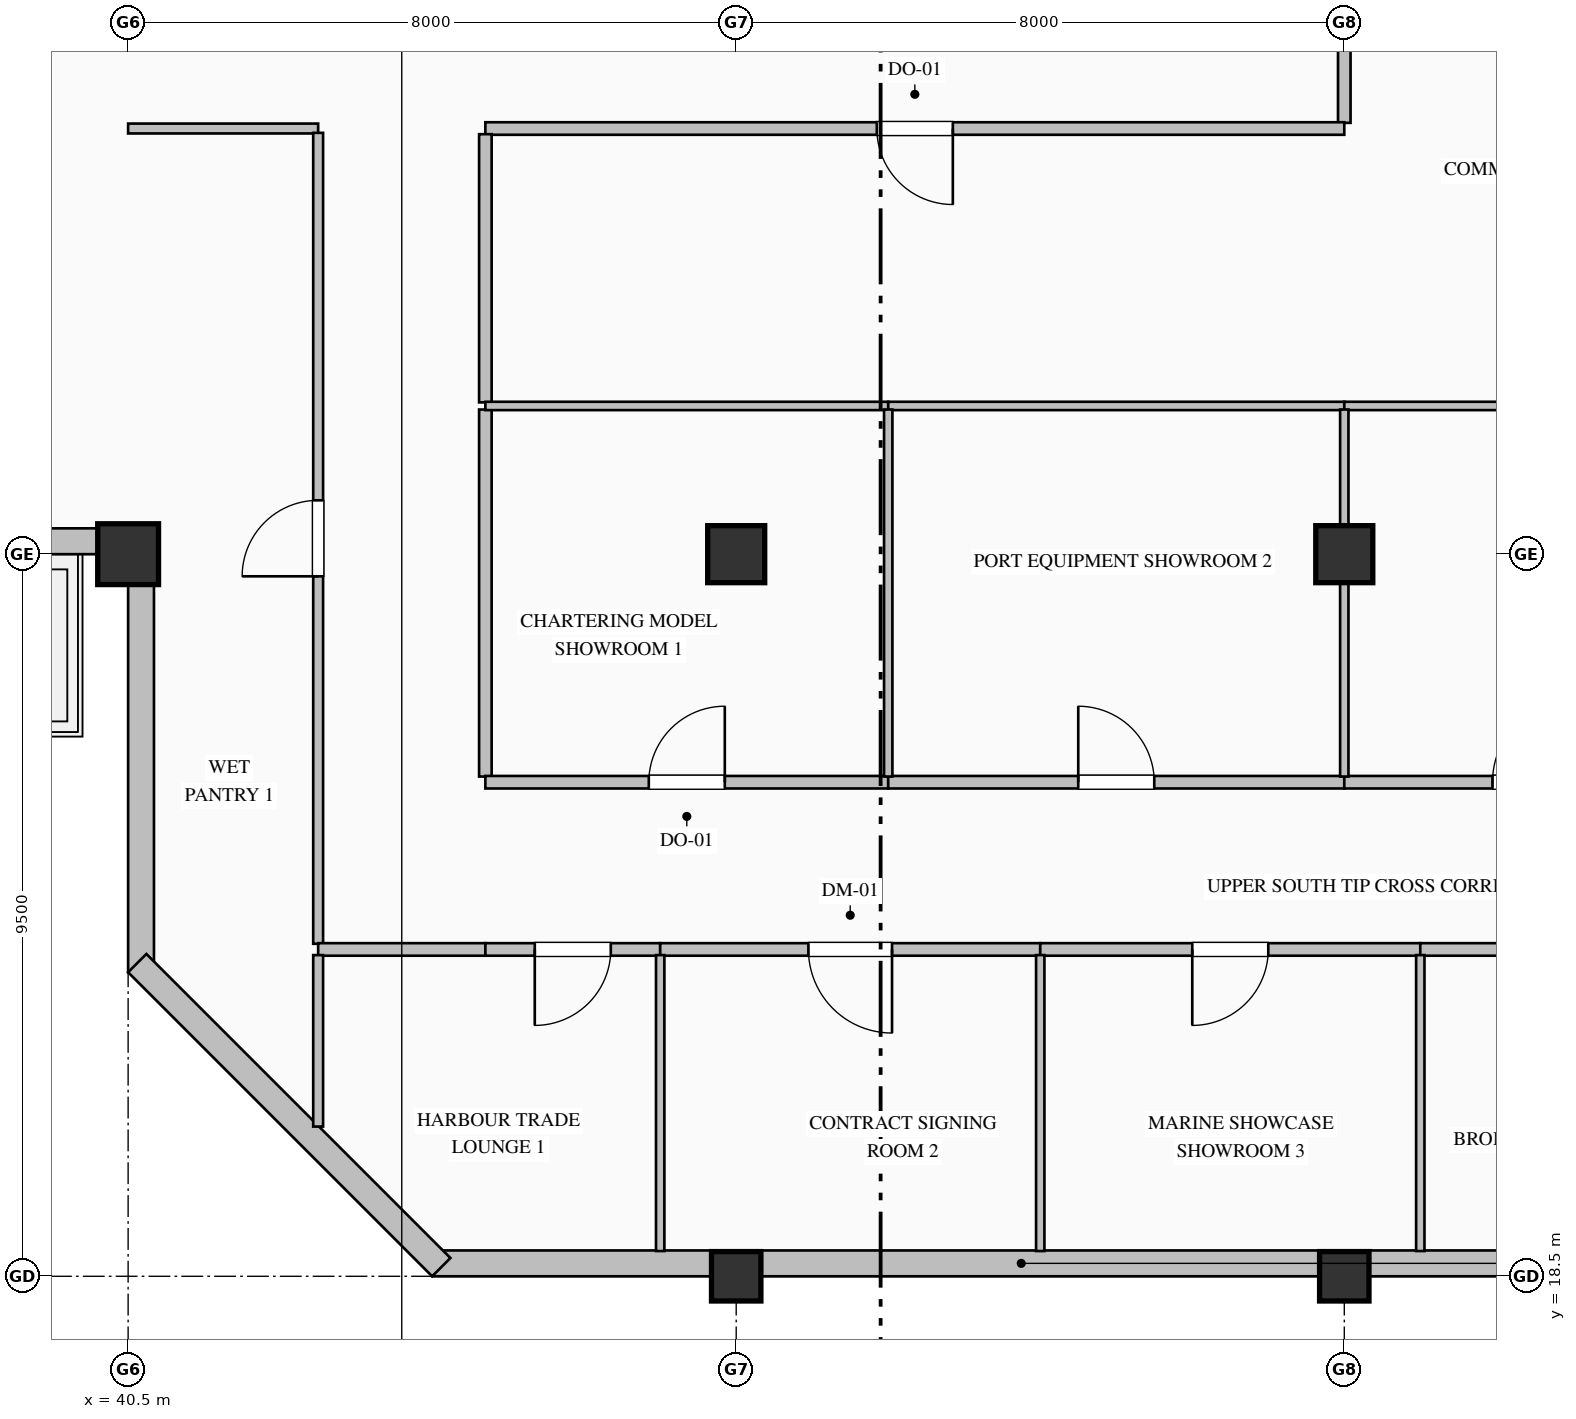
"""IFC4 building model, lengths in metres.
Left out: names, types, materials, properties, quantities, classifications, styles, units other than length and angle.
Written with IfcOpenShell. Run it as: python <this file> out.ifc"""

import sys

from ifc_helpers import new_model, si_unit, direction, frame, frame_2d, origin, origin_2d, place, context, subcontext, project, spatial, rectangle, hollow_rectangle, extrude, element, fill, save


model = new_model("IFC4")
c1 = context("Model", 3, precision=1e-05, world=origin(), true_north=direction((0.0, 1.0)))
c2 = subcontext(c1, "Body", "Model", "MODEL_VIEW")
j1 = project(units=[si_unit("LENGTHUNIT", "METRE"), si_unit("PLANEANGLEUNIT", "RADIAN")], contexts=[c1])
p1 = place(None, origin())
s1 = spatial("IfcSite", under=j1, at=p1, CompositionType="ELEMENT")
p2 = place(p1, origin())
s2 = spatial("IfcBuilding", under=s1, at=p2, CompositionType="ELEMENT")
p3 = place(p2, frame((0.0, 0.0, 359.2)))
s3 = spatial("IfcBuildingStorey", under=s2, at=p3, CompositionType="ELEMENT", Elevation=359.2)
p4 = place(p3, frame((40.5, 28.0, 0.0), z_axis=(0.0, 0.0, 1.0), x_axis=(1.0, 0.0, 0.0)))
e1 = element("IfcColumn", 1, at=p4, inside=s3, PredefinedType="COLUMN", context=c2, shape_type="SweptSolid", body=[
    extrude(hollow_rectangle(XDim=0.8, YDim=0.8, WallThickness=0.032, at=origin_2d()), origin(), (0.0, 0.0, 1.0), 4.0),
])
p5 = place(p3, frame((48.5, 18.5, 0.0), z_axis=(0.0, 0.0, 1.0), x_axis=(1.0, 0.0, 0.0)))
e2 = element("IfcColumn", 2, at=p5, inside=s3, PredefinedType="COLUMN", context=c2, shape_type="SweptSolid", body=[
    extrude(hollow_rectangle(XDim=0.65, YDim=0.65, WallThickness=0.028, at=origin_2d()), origin(), (0.0, 0.0, 1.0), 4.0),
])
p6 = place(p3, frame((48.5, 28.0, 0.0), z_axis=(0.0, 0.0, 1.0), x_axis=(1.0, 0.0, 0.0)))
e3 = element("IfcColumn", 3, at=p6, inside=s3, PredefinedType="COLUMN", context=c2, shape_type="SweptSolid", body=[
    extrude(rectangle(XDim=0.75, YDim=0.75, at=origin_2d()), origin(), (0.0, 0.0, 1.0), 4.0),
])
p7 = place(p3, frame((56.5, 18.5, 0.0), z_axis=(0.0, 0.0, 1.0), x_axis=(1.0, 0.0, 0.0)))
e4 = element("IfcColumn", 4, at=p7, inside=s3, PredefinedType="COLUMN", context=c2, shape_type="SweptSolid", body=[
    extrude(hollow_rectangle(XDim=0.65, YDim=0.65, WallThickness=0.028, at=origin_2d()), origin(), (0.0, 0.0, 1.0), 4.0),
])
p8 = place(p3, frame((56.5, 28.0, 0.0), z_axis=(0.0, 0.0, 1.0), x_axis=(1.0, 0.0, 0.0)))
e5 = element("IfcColumn", 5, at=p8, inside=s3, PredefinedType="COLUMN", context=c2, shape_type="SweptSolid", body=[
    extrude(rectangle(XDim=0.75, YDim=0.75, at=origin_2d()), origin(), (0.0, 0.0, 1.0), 4.0),
])
p9 = place(p3, frame((40.67, 22.5, 0.0), z_axis=(0.0, 0.0, 1.0), x_axis=(0.0, 1.0, 0.0)))
e6 = element("IfcWall", 6, at=p9, inside=s3, PredefinedType="SOLIDWALL", context=c2, shape_type="SweptSolid", body=[
    extrude(rectangle(XDim=5.84, YDim=0.34, at=frame_2d((2.92, 0.0))), origin(), (0.0, 0.0, 1.0), 3.185),
])
p10 = place(p3, frame((40.52, 28.17, 0.0), z_axis=(0.0, 0.0, 1.0), x_axis=(-1.0, 0.0, 0.0)))
e7 = element("IfcWall", 7, at=p10, inside=s3, PredefinedType="SOLIDWALL", context=c2, shape_type="SweptSolid", body=[
    extrude(rectangle(XDim=20.02, YDim=0.34, at=frame_2d((10.01, 0.0))), origin(), (0.0, 0.0, 1.0), 3.185),
])
p11 = place(p10, frame((3.075, 0.0, 0.8)))
e8 = element("IfcOpeningElement", 8, at=p11, cuts=e7, PredefinedType="OPENING", context=c2, shape_type="SweptSolid", body=[
    extrude(rectangle(XDim=1.05, YDim=2.15, at=frame_2d((0.525, 1.075))), frame((0.0, 0.18, 0.0), z_axis=(0.0, -1.0, 0.0), x_axis=(1.0, 0.0, 0.0)), (0.0, 0.0, 1.0), 0.36),
])
p12 = place(p10, frame((13.875, 0.0, 0.8)))
e9 = element("IfcOpeningElement", 9, at=p12, cuts=e7, PredefinedType="OPENING", context=c2, shape_type="SweptSolid", body=[
    extrude(rectangle(XDim=1.05, YDim=2.15, at=frame_2d((0.525, 1.075))), frame((0.0, 0.18, 0.0), z_axis=(0.0, -1.0, 0.0), x_axis=(1.0, 0.0, 0.0)), (0.0, 0.0, 1.0), 0.36),
])
p13 = place(p10, frame((11.395, 0.0, 0.0)))
e10 = element("IfcOpeningElement", 10, at=p13, cuts=e7, PredefinedType="OPENING", context=c2, shape_type="SweptSolid", body=[
    extrude(rectangle(XDim=1.25, YDim=2.25, at=frame_2d((0.625, 1.125))), frame((0.0, 0.18, 0.0), z_axis=(0.0, -1.0, 0.0), x_axis=(1.0, 0.0, 0.0)), (0.0, 0.0, 1.0), 0.36),
])
p14 = place(p3, frame((60.0, 18.67, 0.0), z_axis=(0.0, 0.0, 1.0), x_axis=(-1.0, 0.0, 0.0)))
e11 = element("IfcWall", 11, at=p14, inside=s3, PredefinedType="SOLIDWALL", context=c2, shape_type="SweptSolid", body=[
    extrude(rectangle(XDim=15.5, YDim=0.34, at=frame_2d((7.75, 0.0))), origin(), (0.0, 0.0, 1.0), 3.335),
])
p15 = place(p3, frame((44.62, 18.62, 0.0), z_axis=(0.0, 0.0, 1.0), x_axis=(-0.707106781187, 0.707106781187, 0.0)))
e12 = element("IfcWall", 12, at=p15, inside=s3, PredefinedType="SOLIDWALL", context=c2, shape_type="SweptSolid", body=[
    extrude(rectangle(XDim=5.657, YDim=0.34, at=frame_2d((2.828, 0.0))), origin(), (0.0, 0.0, 1.0), 3.785),
])
p16 = place(p3, frame((56.5, 36.0, 0.0), z_axis=(0.0, 0.0, 1.0), x_axis=(0.0, -1.0, 0.0)))
e13 = element("IfcWall", 13, at=p16, inside=s3, PredefinedType="PARTITIONING", context=c2, shape_type="SweptSolid", body=[
    extrude(rectangle(XDim=2.325, YDim=0.165, at=frame_2d((1.163, 0.0))), origin(), (0.0, 0.0, 1.0), 3.177),
])
p17 = place(p3, frame((56.5, 33.6, 0.0), z_axis=(0.0, 0.0, 1.0), x_axis=(-1.0, 0.0, 0.0)))
e14 = element("IfcWall", 14, at=p17, inside=s3, PredefinedType="PARTITIONING", context=c2, shape_type="SweptSolid", body=[
    extrude(rectangle(XDim=11.3, YDim=0.165, at=frame_2d((5.65, 0.0))), origin(), (0.0, 0.0, 1.0), 3.785),
])
p18 = place(p17, frame((5.15, 0.0, 0.0)))
e15 = element("IfcOpeningElement", 15, at=p18, cuts=e14, PredefinedType="OPENING", context=c2, shape_type="SweptSolid", body=[
    extrude(rectangle(XDim=1.0, YDim=2.15, at=frame_2d((0.5, 1.075))), frame((0.0, 0.093, 0.0), z_axis=(0.0, -1.0, 0.0), x_axis=(1.0, 0.0, 0.0)), (0.0, 0.0, 1.0), 0.185),
])
p19 = place(p3, frame((43.0, 33.6, 0.0), z_axis=(0.0, 0.0, 1.0), x_axis=(-1.0, 0.0, 0.0)))
e16 = element("IfcWall", 16, at=p19, inside=s3, PredefinedType="PARTITIONING", context=c2, shape_type="SweptSolid", body=[
    extrude(rectangle(XDim=2.5, YDim=0.13, at=frame_2d((1.25, 0.0))), origin(), (0.0, 0.0, 1.0), 3.785),
])
p20 = place(p3, frame((45.2, 33.525, 0.0), z_axis=(0.0, 0.0, 1.0), x_axis=(0.0, -1.0, 0.0)))
e17 = element("IfcWall", 17, at=p20, inside=s3, PredefinedType="PARTITIONING", context=c2, shape_type="SweptSolid", body=[
    extrude(rectangle(XDim=3.528, YDim=0.165, at=frame_2d((1.764, 0.0))), origin(), (0.0, 0.0, 1.0), 3.785),
])
p21 = place(p3, frame((45.2, 29.903, 0.0), z_axis=(0.0, 0.0, 1.0), x_axis=(0.0, -1.0, 0.0)))
e18 = element("IfcWall", 18, at=p21, inside=s3, PredefinedType="PARTITIONING", context=c2, shape_type="SweptSolid", body=[
    extrude(rectangle(XDim=4.829, YDim=0.165, at=frame_2d((2.414, 0.0))), origin(), (0.0, 0.0, 1.0), 3.785),
])
p22 = place(p3, frame((43.0, 22.875, 0.0), z_axis=(0.0, 0.0, 1.0), x_axis=(0.0, 1.0, 0.0)))
e19 = element("IfcWall", 19, at=p22, inside=s3, PredefinedType="PARTITIONING", context=c2, shape_type="SweptSolid", body=[
    extrude(rectangle(XDim=10.668, YDim=0.13, at=frame_2d((5.334, 0.0))), origin(), (0.0, 0.0, 1.0), 3.785),
])
p23 = place(p22, frame((4.834, 0.0, 0.0)))
e20 = element("IfcOpeningElement", 20, at=p23, cuts=e19, PredefinedType="OPENING", context=c2, shape_type="SweptSolid", body=[
    extrude(rectangle(XDim=1.0, YDim=2.15, at=frame_2d((0.5, 1.075))), frame((0.0, 0.075, 0.0), z_axis=(0.0, -1.0, 0.0), x_axis=(1.0, 0.0, 0.0)), (0.0, 0.0, 1.0), 0.15),
])
p24 = place(p3, frame((45.2, 22.8, 0.0), z_axis=(0.0, 0.0, 1.0), x_axis=(-1.0, 0.0, 0.0)))
e21 = element("IfcWall", 21, at=p24, inside=s3, PredefinedType="PARTITIONING", context=c2, shape_type="SweptSolid", body=[
    extrude(rectangle(XDim=2.2, YDim=0.165, at=frame_2d((1.1, 0.0))), origin(), (0.0, 0.0, 1.0), 3.785),
])
p25 = place(p3, frame((45.2, 25.0, 0.0), z_axis=(0.0, 0.0, 1.0), x_axis=(1.0, 0.0, 0.0)))
e22 = element("IfcWall", 22, at=p25, inside=s3, PredefinedType="PARTITIONING", context=c2, shape_type="SweptSolid", body=[
    extrude(rectangle(XDim=5.3, YDim=0.165, at=frame_2d((2.65, 0.0))), origin(), (0.0, 0.0, 1.0), 3.785),
])
p26 = place(p25, frame((2.15, 0.0, 0.0)))
e23 = element("IfcOpeningElement", 23, at=p26, cuts=e22, PredefinedType="OPENING", context=c2, shape_type="SweptSolid", body=[
    extrude(rectangle(XDim=1.0, YDim=2.15, at=frame_2d((0.5, 1.075))), frame((0.0, 0.093, 0.0), z_axis=(0.0, -1.0, 0.0), x_axis=(1.0, 0.0, 0.0)), (0.0, 0.0, 1.0), 0.185),
])
p27 = place(p3, frame((50.5, 25.0, 0.0), z_axis=(0.0, 0.0, 1.0), x_axis=(1.0, 0.0, 0.0)))
e24 = element("IfcWall", 24, at=p27, inside=s3, PredefinedType="PARTITIONING", context=c2, shape_type="SweptSolid", body=[
    extrude(rectangle(XDim=6.0, YDim=0.165, at=frame_2d((3.0, 0.0))), origin(), (0.0, 0.0, 1.0), 3.785),
])
p28 = place(p27, frame((2.5, 0.0, 0.0)))
e25 = element("IfcOpeningElement", 25, at=p28, cuts=e24, PredefinedType="OPENING", context=c2, shape_type="SweptSolid", body=[
    extrude(rectangle(XDim=1.0, YDim=2.15, at=frame_2d((0.5, 1.075))), frame((0.0, 0.093, 0.0), z_axis=(0.0, -1.0, 0.0), x_axis=(1.0, 0.0, 0.0)), (0.0, 0.0, 1.0), 0.185),
])
p29 = place(p3, frame((56.5, 25.0, 0.0), z_axis=(0.0, 0.0, 1.0), x_axis=(1.0, 0.0, 0.0)))
e26 = element("IfcWall", 26, at=p29, inside=s3, PredefinedType="PARTITIONING", context=c2, shape_type="SweptSolid", body=[
    extrude(rectangle(XDim=5.0, YDim=0.165, at=frame_2d((2.5, 0.0))), origin(), (0.0, 0.0, 1.0), 3.785),
])
p30 = place(p29, frame((1.95, 0.0, 0.0)))
e27 = element("IfcOpeningElement", 27, at=p30, cuts=e26, PredefinedType="OPENING", context=c2, shape_type="SweptSolid", body=[
    extrude(rectangle(XDim=1.1, YDim=2.2, at=frame_2d((0.55, 1.1))), frame((0.0, 0.093, 0.0), z_axis=(0.0, -1.0, 0.0), x_axis=(1.0, 0.0, 0.0)), (0.0, 0.0, 1.0), 0.185),
])
p31 = place(p3, frame((47.5, 22.8, 0.0), z_axis=(0.0, 0.0, 1.0), x_axis=(-1.0, 0.0, 0.0)))
e28 = element("IfcWall", 28, at=p31, inside=s3, PredefinedType="PARTITIONING", context=c2, shape_type="SweptSolid", body=[
    extrude(rectangle(XDim=2.3, YDim=0.165, at=frame_2d((1.15, 0.0))), origin(), (0.0, 0.0, 1.0), 3.785),
])
p32 = place(p31, frame((0.65, 0.0, 0.0)))
e29 = element("IfcOpeningElement", 29, at=p32, cuts=e28, PredefinedType="OPENING", context=c2, shape_type="SweptSolid", body=[
    extrude(rectangle(XDim=1.0, YDim=2.15, at=frame_2d((0.5, 1.075))), frame((0.0, 0.093, 0.0), z_axis=(0.0, -1.0, 0.0), x_axis=(1.0, 0.0, 0.0)), (0.0, 0.0, 1.0), 0.185),
])
p33 = place(p3, frame((52.5, 22.8, 0.0), z_axis=(0.0, 0.0, 1.0), x_axis=(-1.0, 0.0, 0.0)))
e30 = element("IfcWall", 30, at=p33, inside=s3, PredefinedType="PARTITIONING", context=c2, shape_type="SweptSolid", body=[
    extrude(rectangle(XDim=5.0, YDim=0.165, at=frame_2d((2.5, 0.0))), origin(), (0.0, 0.0, 1.0), 3.785),
])
p34 = place(p33, frame((1.95, 0.0, 0.0)))
e31 = element("IfcOpeningElement", 31, at=p34, cuts=e30, PredefinedType="OPENING", context=c2, shape_type="SweptSolid", body=[
    extrude(rectangle(XDim=1.1, YDim=2.2, at=frame_2d((0.55, 1.1))), frame((0.0, 0.093, 0.0), z_axis=(0.0, -1.0, 0.0), x_axis=(1.0, 0.0, 0.0)), (0.0, 0.0, 1.0), 0.185),
])
p35 = place(p3, frame((57.5, 22.8, 0.0), z_axis=(0.0, 0.0, 1.0), x_axis=(-1.0, 0.0, 0.0)))
e32 = element("IfcWall", 32, at=p35, inside=s3, PredefinedType="PARTITIONING", context=c2, shape_type="SweptSolid", body=[
    extrude(rectangle(XDim=5.0, YDim=0.165, at=frame_2d((2.5, 0.0))), origin(), (0.0, 0.0, 1.0), 3.785),
])
p36 = place(p35, frame((2.0, 0.0, 0.0)))
e33 = element("IfcOpeningElement", 33, at=p36, cuts=e32, PredefinedType="OPENING", context=c2, shape_type="SweptSolid", body=[
    extrude(rectangle(XDim=1.0, YDim=2.15, at=frame_2d((0.5, 1.075))), frame((0.0, 0.093, 0.0), z_axis=(0.0, -1.0, 0.0), x_axis=(1.0, 0.0, 0.0)), (0.0, 0.0, 1.0), 0.185),
])
p37 = place(p3, frame((61.5, 22.8, 0.0), z_axis=(0.0, 0.0, 1.0), x_axis=(-1.0, 0.0, 0.0)))
e34 = element("IfcWall", 34, at=p37, inside=s3, PredefinedType="PARTITIONING", context=c2, shape_type="SweptSolid", body=[
    extrude(rectangle(XDim=4.0, YDim=0.165, at=frame_2d((2.0, 0.0))), origin(), (0.0, 0.0, 1.0), 3.785),
])
p38 = place(p37, frame((1.5, 0.0, 0.0)))
e35 = element("IfcOpeningElement", 35, at=p38, cuts=e34, PredefinedType="OPENING", context=c2, shape_type="SweptSolid", body=[
    extrude(rectangle(XDim=1.0, YDim=2.15, at=frame_2d((0.5, 1.075))), frame((0.0, 0.093, 0.0), z_axis=(0.0, -1.0, 0.0), x_axis=(1.0, 0.0, 0.0)), (0.0, 0.0, 1.0), 0.185),
])
p39 = place(p3, frame((50.5, 29.95, 0.0), z_axis=(0.0, 0.0, 1.0), x_axis=(-1.0, 0.0, 0.0)))
e36 = element("IfcWall", 36, at=p39, inside=s3, PredefinedType="MOVABLE", context=c2, shape_type="SweptSolid", body=[
    extrude(rectangle(XDim=5.3, YDim=0.11, at=frame_2d((2.65, 0.0))), origin(), (0.0, 0.0, 1.0), 3.785),
])
p40 = place(p3, frame((56.5, 29.95, 0.0), z_axis=(0.0, 0.0, 1.0), x_axis=(-1.0, 0.0, 0.0)))
e37 = element("IfcWall", 37, at=p40, inside=s3, PredefinedType="MOVABLE", context=c2, shape_type="SweptSolid", body=[
    extrude(rectangle(XDim=6.0, YDim=0.11, at=frame_2d((3.0, 0.0))), origin(), (0.0, 0.0, 1.0), 3.785),
])
p41 = place(p3, frame((63.668, 29.95, 0.0), z_axis=(0.0, 0.0, 1.0), x_axis=(-1.0, 0.0, 0.0)))
e38 = element("IfcWall", 38, at=p41, inside=s3, PredefinedType="MOVABLE", context=c2, shape_type="SweptSolid", body=[
    extrude(rectangle(XDim=7.168, YDim=0.11, at=frame_2d((3.584, 0.0))), origin(), (0.0, 0.0, 1.0), 3.785),
])
p42 = place(p3, frame((50.5, 29.903, 0.0), z_axis=(0.0, 0.0, 1.0), x_axis=(0.0, -1.0, 0.0)))
e39 = element("IfcWall", 39, at=p42, inside=s3, PredefinedType="MOVABLE", context=c2, shape_type="SweptSolid", body=[
    extrude(rectangle(XDim=4.829, YDim=0.11, at=frame_2d((2.414, 0.0))), origin(), (0.0, 0.0, 1.0), 3.785),
])
p43 = place(p3, frame((56.5, 29.903, 0.0), z_axis=(0.0, 0.0, 1.0), x_axis=(0.0, -1.0, 0.0)))
e40 = element("IfcWall", 40, at=p43, inside=s3, PredefinedType="MOVABLE", context=c2, shape_type="SweptSolid", body=[
    extrude(rectangle(XDim=4.829, YDim=0.11, at=frame_2d((2.414, 0.0))), origin(), (0.0, 0.0, 1.0), 2.977),
])
p44 = place(p3, frame((43.0, 22.726, 0.0), z_axis=(0.0, 0.0, 1.0), x_axis=(0.0, -1.0, 0.0)))
e41 = element("IfcWall", 41, at=p44, inside=s3, PredefinedType="PARTITIONING", context=c2, shape_type="SweptSolid", body=[
    extrude(rectangle(XDim=2.256, YDim=0.13, at=frame_2d((1.128, 0.0))), origin(), (0.0, 0.0, 1.0), 3.785),
])
for number, where, z_axis, x_axis in (
    (42, (47.5, 22.726, 0.0), (0.0, 0.0, 1.0), (0.0, -1.0, 0.0)),
    (43, (52.5, 22.726, 0.0), (0.0, 0.0, 1.0), (0.0, -1.0, 0.0)),
    (44, (57.5, 22.726, 0.0), (0.0, 0.0, 1.0), (0.0, -1.0, 0.0)),
):
    element("IfcWall", number, at=place(p3, frame(where, z_axis=z_axis, x_axis=x_axis)), inside=s3, PredefinedType="MOVABLE", context=c2, shape_type="SweptSolid", body=[
        extrude(rectangle(XDim=3.894, YDim=0.11, at=frame_2d((1.947, 0.0))), origin(), (0.0, 0.0, 1.0), 3.785),
    ])
p45 = place(p18, origin())
e45 = element("IfcDoor", 45, at=p45, inside=s3, OperationType="SINGLE_SWING_LEFT", PredefinedType="DOOR", context=c2, shape_type="SweptSolid", body=[
    extrude(rectangle(XDim=1.0, YDim=2.15, at=frame_2d((0.5, 1.075))), frame((0.0, 0.025, 0.0), z_axis=(0.0, -1.0, 0.0), x_axis=(1.0, 0.0, 0.0)), (0.0, 0.0, 1.0), 0.05),
])
fill(e15, e45)
p46 = place(p26, origin())
e46 = element("IfcDoor", 46, at=p46, inside=s3, OperationType="SINGLE_SWING_RIGHT", PredefinedType="DOOR", context=c2, shape_type="SweptSolid", body=[
    extrude(rectangle(XDim=1.0, YDim=2.15, at=frame_2d((0.5, 1.075))), frame((0.0, 0.025, 0.0), z_axis=(0.0, -1.0, 0.0), x_axis=(1.0, 0.0, 0.0)), (0.0, 0.0, 1.0), 0.05),
])
fill(e23, e46)
p47 = place(p28, origin())
e47 = element("IfcDoor", 47, at=p47, inside=s3, OperationType="SINGLE_SWING_LEFT", PredefinedType="DOOR", context=c2, shape_type="SweptSolid", body=[
    extrude(rectangle(XDim=1.0, YDim=2.15, at=frame_2d((0.5, 1.075))), frame((0.0, 0.025, 0.0), z_axis=(0.0, -1.0, 0.0), x_axis=(1.0, 0.0, 0.0)), (0.0, 0.0, 1.0), 0.05),
])
fill(e25, e47)
p48 = place(p30, origin())
e48 = element("IfcDoor", 48, at=p48, inside=s3, OperationType="SINGLE_SWING_RIGHT", PredefinedType="DOOR", context=c2, shape_type="SweptSolid", body=[
    extrude(rectangle(XDim=1.1, YDim=2.2, at=frame_2d((0.55, 1.1))), frame((0.0, 0.025, 0.0), z_axis=(0.0, -1.0, 0.0), x_axis=(1.0, 0.0, 0.0)), (0.0, 0.0, 1.0), 0.05),
])
fill(e27, e48)
p49 = place(p23, origin())
e49 = element("IfcDoor", 49, at=p49, inside=s3, OperationType="SINGLE_SWING_LEFT", PredefinedType="DOOR", context=c2, shape_type="SweptSolid", body=[
    extrude(rectangle(XDim=1.0, YDim=2.15, at=frame_2d((0.5, 1.075))), frame((0.0, 0.025, 0.0), z_axis=(0.0, -1.0, 0.0), x_axis=(1.0, 0.0, 0.0)), (0.0, 0.0, 1.0), 0.05),
])
fill(e20, e49)
p50 = place(p32, origin())
e50 = element("IfcDoor", 50, at=p50, inside=s3, OperationType="SINGLE_SWING_RIGHT", PredefinedType="DOOR", context=c2, shape_type="SweptSolid", body=[
    extrude(rectangle(XDim=1.0, YDim=2.15, at=frame_2d((0.5, 1.075))), frame((0.0, 0.025, 0.0), z_axis=(0.0, -1.0, 0.0), x_axis=(1.0, 0.0, 0.0)), (0.0, 0.0, 1.0), 0.05),
])
fill(e29, e50)
p51 = place(p34, origin())
e51 = element("IfcDoor", 51, at=p51, inside=s3, OperationType="SINGLE_SWING_LEFT", PredefinedType="DOOR", context=c2, shape_type="SweptSolid", body=[
    extrude(rectangle(XDim=1.1, YDim=2.2, at=frame_2d((0.55, 1.1))), frame((0.0, 0.025, 0.0), z_axis=(0.0, -1.0, 0.0), x_axis=(1.0, 0.0, 0.0)), (0.0, 0.0, 1.0), 0.05),
])
fill(e31, e51)
p52 = place(p36, origin())
e52 = element("IfcDoor", 52, at=p52, inside=s3, OperationType="SINGLE_SWING_RIGHT", PredefinedType="DOOR", context=c2, shape_type="SweptSolid", body=[
    extrude(rectangle(XDim=1.0, YDim=2.15, at=frame_2d((0.5, 1.075))), frame((0.0, 0.025, 0.0), z_axis=(0.0, -1.0, 0.0), x_axis=(1.0, 0.0, 0.0)), (0.0, 0.0, 1.0), 0.05),
])
fill(e33, e52)
save(model, sys.argv[1])
